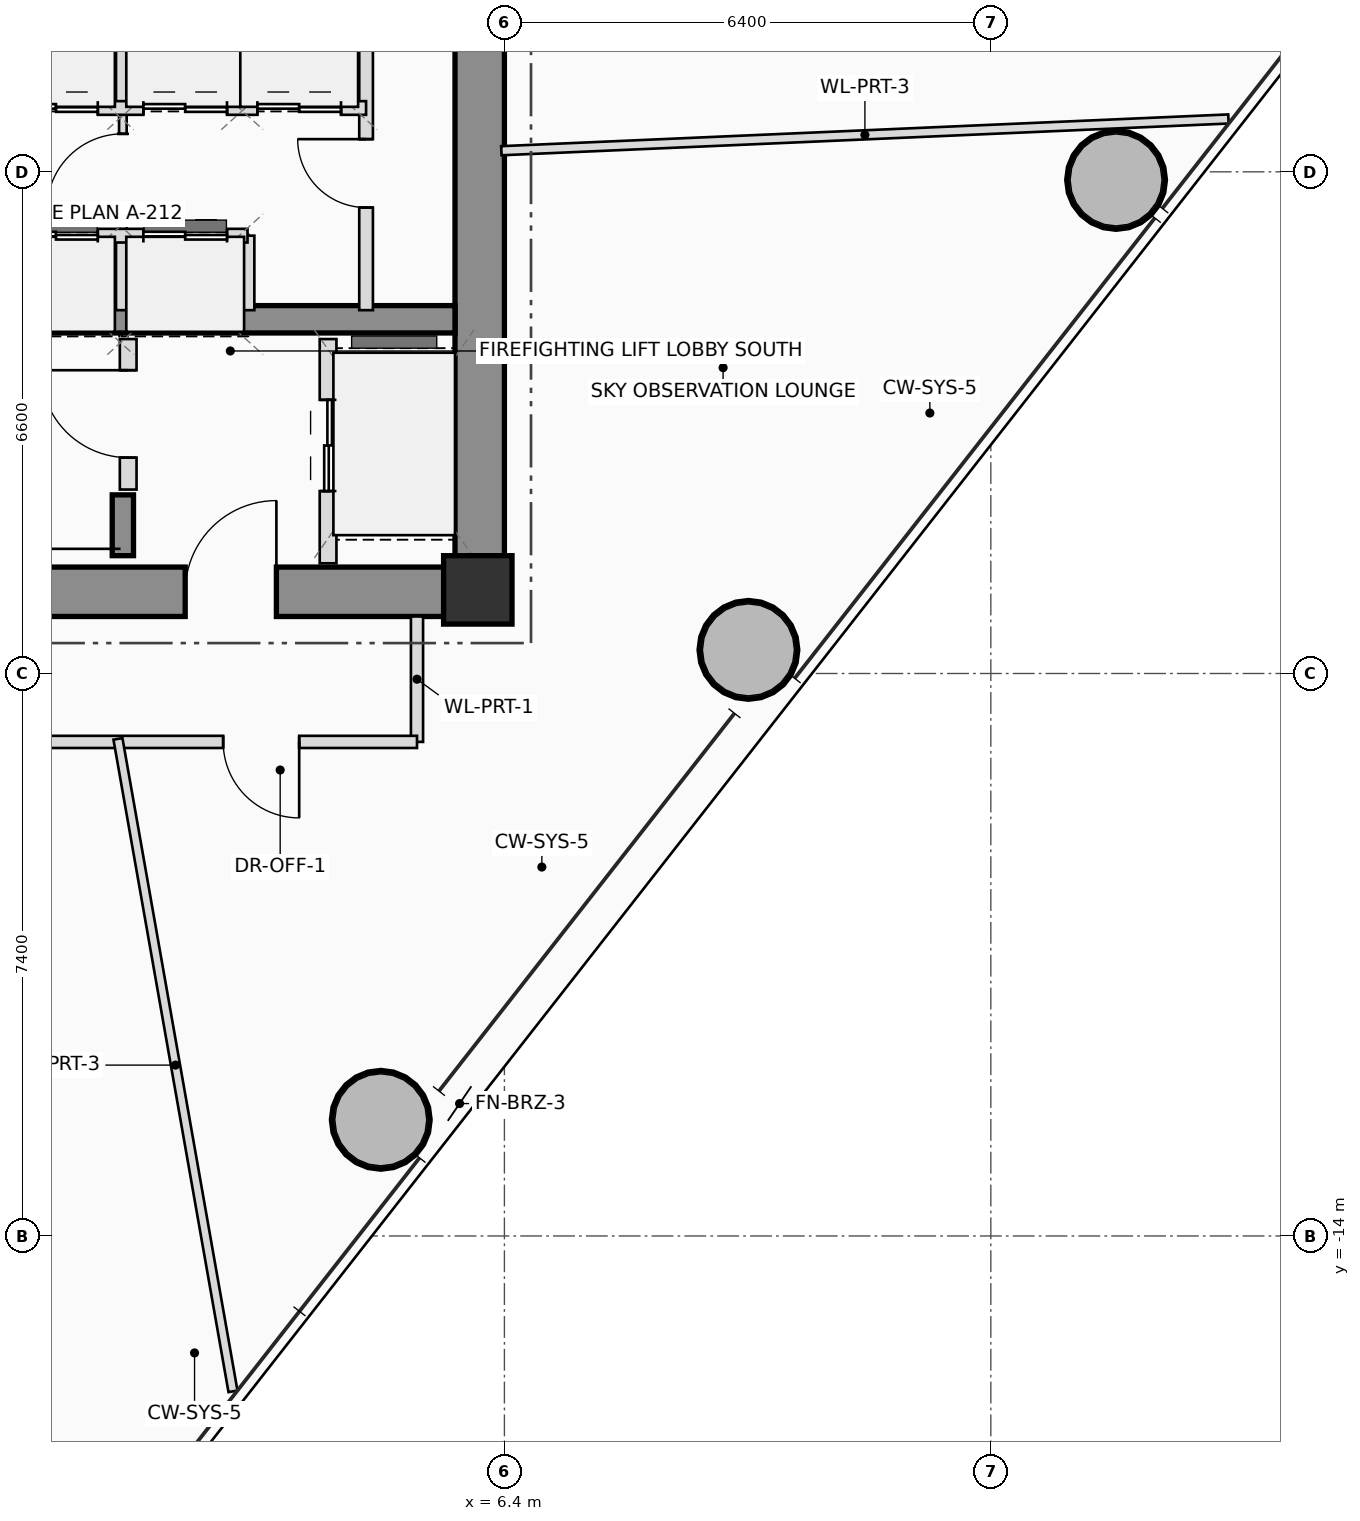
"""IFC4 building model, lengths in metres.
Left out: names, types, materials, properties, quantities, classifications, styles, units other than length and angle.
Written with IfcOpenShell. Run it as: python <this file> out.ifc"""

import sys

from ifc_helpers import new_model, si_unit, direction, frame, frame_2d, origin, origin_2d, place, context, subcontext, project, spatial, rectangle, hollow_circle, extrude, source, transform, mapped, element, fill, save


model = new_model("IFC4")
c1 = context("Model", 3, precision=1e-05, world=origin(), true_north=direction((0.0, 1.0)))
c2 = subcontext(c1, "Body", "Model", "MODEL_VIEW")
j1 = project(units=[si_unit("LENGTHUNIT", "METRE"), si_unit("PLANEANGLEUNIT", "RADIAN")], contexts=[c1])
p1 = place(None, origin())
s1 = spatial("IfcSite", under=j1, at=p1, CompositionType="ELEMENT")
p2 = place(p1, origin())
s2 = spatial("IfcBuilding", under=s1, at=p2, CompositionType="ELEMENT")
p3 = place(p2, frame((0.0, 0.0, 125.0)))
s3 = spatial("IfcBuildingStorey", under=s2, at=p3, CompositionType="ELEMENT", Elevation=125.0)
m1 = source(origin(), c2, "Body", "SweptSolid", [
    extrude(rectangle(XDim=0.9, YDim=0.9, at=origin_2d()), origin(), (0.0, 0.0, 1.0), 4.5),
])
p4 = place(p3, frame((6.05, -5.5, 0.0), z_axis=(0.0, 0.0, 1.0), x_axis=(1.0, 0.0, 0.0)))
e1 = element("IfcColumn", 1, at=p4, inside=s3, PredefinedType="COLUMN", context=c2, shape_type="MappedRepresentation", body=[
    mapped(m1, transform((0.0, 0.0, 0.0), scale=1.0)),
])
p5 = place(p3, frame((-6.4, -5.525, 0.0), z_axis=(0.0, 0.0, 1.0), x_axis=(1.0, 0.0, 0.0)))
e2 = element("IfcWall", 2, at=p5, inside=s3, PredefinedType="SHEAR", context=c2, shape_type="SweptSolid", body=[
    extrude(rectangle(XDim=12.8, YDim=0.65, at=frame_2d((6.4, 0.0))), origin(), (0.0, 0.0, 1.0), 4.5),
])
p6 = place(p5, frame((8.6, 0.0, 0.0)))
e3 = element("IfcOpeningElement", 3, at=p6, cuts=e2, PredefinedType="OPENING", context=c2, shape_type="SweptSolid", body=[
    extrude(rectangle(XDim=1.2, YDim=2.2, at=frame_2d((0.6, 1.1))), frame((0.0, 0.335, 0.0), z_axis=(0.0, -1.0, 0.0), x_axis=(1.0, 0.0, 0.0)), (0.0, 0.0, 1.0), 0.67),
])
p7 = place(p3, frame((6.075, -5.2, 0.0), z_axis=(0.0, 0.0, 1.0), x_axis=(0.0, 1.0, 0.0)))
e4 = element("IfcWall", 4, at=p7, inside=s3, PredefinedType="SHEAR", context=c2, shape_type="SweptSolid", body=[
    extrude(rectangle(XDim=10.4, YDim=0.65, at=frame_2d((5.2, 0.0))), origin(), (0.0, 0.0, 1.0), 4.5),
])
p8 = place(p3, frame((-5.75, -1.94, 0.0), z_axis=(0.0, 0.0, 1.0), x_axis=(1.0, 0.0, 0.0)))
e5 = element("IfcWall", 5, at=p8, inside=s3, PredefinedType="SHEAR", context=c2, shape_type="SweptSolid", body=[
    extrude(rectangle(XDim=11.5, YDim=0.36, at=frame_2d((5.75, 0.0))), origin(), (0.0, 0.0, 1.0), 4.5),
])
p9 = place(p3, frame((1.38, -5.05, 0.0), z_axis=(0.0, 0.0, 1.0), x_axis=(0.0, 1.0, 0.0)))
e6 = element("IfcWall", 6, at=p9, inside=s3, PredefinedType="SHEAR", context=c2, shape_type="SweptSolid", body=[
    extrude(rectangle(XDim=0.8, YDim=0.28, at=frame_2d((0.4, 0.0))), origin(), (0.0, 0.0, 1.0), 4.5),
])
m2 = source(origin(), c2, "Body", "SweptSolid", [
    extrude(hollow_circle(Radius=0.65, WallThickness=0.045, at=origin_2d()), origin(), (0.0, 0.0, 1.0), 4.5),
])
for number, where, z_axis, x_axis in (
    (7, (4.773, -12.472, 0.0), (0.0, 0.0, 1.0), (1.0, 0.0, 0.0)),
    (8, (9.611, -6.289, 0.0), (0.0, 0.0, 1.0), (1.0, 0.0, 0.0)),
    (9, (14.448, -0.107, 0.0), (0.0, 0.0, 1.0), (1.0, 0.0, 0.0)),
):
    element("IfcColumn", number, at=place(p3, frame(where, z_axis=z_axis, x_axis=x_axis)), inside=s3, PredefinedType="COLUMN", context=c2, shape_type="MappedRepresentation", body=[
        mapped(m2, transform((0.0, 0.0, 0.0), scale=1.0)),
    ])
p10 = place(p3, frame((1.45, -4.18, 0.0), z_axis=(0.0, 0.0, 1.0), x_axis=(0.0, 1.0, 0.0)))
e10 = element("IfcWall", 10, at=p10, inside=s3, PredefinedType="PLUMBINGWALL", context=c2, shape_type="SweptSolid", body=[
    extrude(rectangle(XDim=1.98, YDim=0.22, at=frame_2d((0.99, 0.0))), origin(), (0.0, 0.0, 1.0), 4.3),
])
p11 = place(p10, frame((0.42, 0.0, 0.0)))
e11 = element("IfcOpeningElement", 11, at=p11, cuts=e10, PredefinedType="OPENING", context=c2, shape_type="SweptSolid", body=[
    extrude(rectangle(XDim=1.15, YDim=2.15, at=frame_2d((0.575, 1.075))), frame((0.0, 0.12, 0.0), z_axis=(0.0, -1.0, 0.0), x_axis=(1.0, 0.0, 0.0)), (0.0, 0.0, 1.0), 0.24),
])
p12 = place(p3, frame((4.08, -5.15, 0.0), z_axis=(0.0, 0.0, 1.0), x_axis=(0.0, 1.0, 0.0)))
e12 = element("IfcWall", 12, at=p12, inside=s3, PredefinedType="PLUMBINGWALL", context=c2, shape_type="SweptSolid", body=[
    extrude(rectangle(XDim=2.95, YDim=0.22, at=frame_2d((1.475, 0.0))), origin(), (0.0, 0.0, 1.0), 4.3),
])
p13 = place(p12, frame((0.95, 0.0, 0.0)))
e13 = element("IfcOpeningElement", 13, at=p13, cuts=e12, PredefinedType="OPENING", context=c2, shape_type="SweptSolid", body=[
    extrude(rectangle(XDim=1.2, YDim=2.25, at=frame_2d((0.6, 1.125))), frame((0.0, 0.12, 0.0), z_axis=(0.0, -1.0, 0.0), x_axis=(1.0, 0.0, 0.0)), (0.0, 0.0, 1.0), 0.24),
])
p14 = place(p3, frame((1.38, -0.84, 0.0), z_axis=(0.0, 0.0, 1.0), x_axis=(0.0, 1.0, 0.0)))
e14 = element("IfcWall", 14, at=p14, inside=s3, PredefinedType="PARTITIONING", context=c2, shape_type="SweptSolid", body=[
    extrude(rectangle(XDim=1.68, YDim=0.1, at=frame_2d((0.84, 0.0))), origin(), (0.0, 0.0, 1.0), 4.3),
])
p15 = place(p14, frame((0.34, 0.0, 0.0)))
e15 = element("IfcOpeningElement", 15, at=p15, cuts=e14, PredefinedType="OPENING", context=c2, shape_type="SweptSolid", body=[
    extrude(rectangle(XDim=1.0, YDim=2.25, at=frame_2d((0.5, 1.125))), frame((0.0, 0.06, 0.0), z_axis=(0.0, -1.0, 0.0), x_axis=(1.0, 0.0, 0.0)), (0.0, 0.0, 1.0), 0.12),
])
for number, where, z_axis, x_axis in (
    (16, (1.38, 0.84, 0.0), (0.0, 0.0, 1.0), (0.0, 1.0, 0.0)),
    (17, (1.38, -1.82, 0.0), (0.0, 0.0, 1.0), (0.0, 1.0, 0.0)),
    (18, (3.02, 0.84, 0.0), (0.0, 0.0, 1.0), (0.0, 1.0, 0.0)),
    (19, (4.38, 0.84, 0.0), (0.0, 0.0, 1.0), (0.0, 1.0, 0.0)),
    (20, (3.02, -1.82, 0.0), (0.0, 0.0, 1.0), (0.0, 1.0, 0.0)),
):
    element("IfcWall", number, at=place(p3, frame(where, z_axis=z_axis, x_axis=x_axis)), inside=s3, PredefinedType="PLUMBINGWALL", context=c2, shape_type="SweptSolid", body=[
        extrude(rectangle(XDim=0.98, YDim=0.18, at=frame_2d((0.49, 0.0))), origin(), (0.0, 0.0, 1.0), 4.3),
    ])
p16 = place(p3, frame((4.58, -1.82, 0.0), z_axis=(0.0, 0.0, 1.0), x_axis=(0.0, 1.0, 0.0)))
e21 = element("IfcWall", 21, at=p16, inside=s3, PredefinedType="PLUMBINGWALL", context=c2, shape_type="SweptSolid", body=[
    extrude(rectangle(XDim=3.64, YDim=0.18, at=frame_2d((1.82, 0.0))), origin(), (0.0, 0.0, 1.0), 4.3),
])
p17 = place(p16, frame((1.35, 0.0, 0.0)))
e22 = element("IfcOpeningElement", 22, at=p17, cuts=e21, PredefinedType="OPENING", context=c2, shape_type="SweptSolid", body=[
    extrude(rectangle(XDim=0.9, YDim=2.05, at=frame_2d((0.45, 1.025))), frame((0.0, 0.1, 0.0), z_axis=(0.0, -1.0, 0.0), x_axis=(1.0, 0.0, 0.0)), (0.0, 0.0, 1.0), 0.2),
])
p18 = place(p3, frame((-5.68, 0.84, 0.0), z_axis=(0.0, 0.0, 1.0), x_axis=(1.0, 0.0, 0.0)))
e23 = element("IfcWall", 23, at=p18, inside=s3, PredefinedType="PLUMBINGWALL", context=c2, shape_type="SweptSolid", body=[
    extrude(rectangle(XDim=10.26, YDim=0.18, at=frame_2d((5.13, 0.0))), origin(), (0.0, 0.0, 1.0), 4.3),
])
p19 = place(p18, frame((1.08, 0.0, 0.0)))
e24 = element("IfcOpeningElement", 24, at=p19, cuts=e23, PredefinedType="OPENING", context=c2, shape_type="SweptSolid", body=[
    extrude(rectangle(XDim=0.9, YDim=2.05, at=frame_2d((0.45, 1.025))), frame((0.0, 0.1, 0.0), z_axis=(0.0, -1.0, 0.0), x_axis=(1.0, 0.0, 0.0)), (0.0, 0.0, 1.0), 0.2),
])
p20 = place(p18, frame((3.93, 0.0, 0.0)))
e25 = element("IfcOpeningElement", 25, at=p20, cuts=e23, PredefinedType="OPENING", context=c2, shape_type="SweptSolid", body=[
    extrude(rectangle(XDim=1.1, YDim=2.2, at=frame_2d((0.55, 1.1))), frame((0.0, 0.1, 0.0), z_axis=(0.0, -1.0, 0.0), x_axis=(1.0, 0.0, 0.0)), (0.0, 0.0, 1.0), 0.2),
])
p21 = place(p18, frame((5.63, 0.0, 0.0)))
e26 = element("IfcOpeningElement", 26, at=p21, cuts=e23, PredefinedType="OPENING", context=c2, shape_type="SweptSolid", body=[
    extrude(rectangle(XDim=1.1, YDim=2.2, at=frame_2d((0.55, 1.1))), frame((0.0, 0.1, 0.0), z_axis=(0.0, -1.0, 0.0), x_axis=(1.0, 0.0, 0.0)), (0.0, 0.0, 1.0), 0.2),
])
p22 = place(p18, frame((7.33, 0.0, 0.0)))
e27 = element("IfcOpeningElement", 27, at=p22, cuts=e23, PredefinedType="OPENING", context=c2, shape_type="SweptSolid", body=[
    extrude(rectangle(XDim=1.1, YDim=2.2, at=frame_2d((0.55, 1.1))), frame((0.0, 0.1, 0.0), z_axis=(0.0, -1.0, 0.0), x_axis=(1.0, 0.0, 0.0)), (0.0, 0.0, 1.0), 0.2),
])
p23 = place(p18, frame((8.83, 0.0, 0.0)))
e28 = element("IfcOpeningElement", 28, at=p23, cuts=e23, PredefinedType="OPENING", context=c2, shape_type="SweptSolid", body=[
    extrude(rectangle(XDim=1.1, YDim=2.2, at=frame_2d((0.55, 1.1))), frame((0.0, 0.1, 0.0), z_axis=(0.0, -1.0, 0.0), x_axis=(1.0, 0.0, 0.0)), (0.0, 0.0, 1.0), 0.2),
])
p24 = place(p3, frame((-5.68, -0.84, 0.0), z_axis=(0.0, 0.0, 1.0), x_axis=(1.0, 0.0, 0.0)))
e29 = element("IfcWall", 29, at=p24, inside=s3, PredefinedType="PLUMBINGWALL", context=c2, shape_type="SweptSolid", body=[
    extrude(rectangle(XDim=8.7, YDim=0.18, at=frame_2d((4.35, 0.0))), origin(), (0.0, 0.0, 1.0), 4.3),
])
p25 = place(p24, frame((1.68, 0.0, 0.0)))
e30 = element("IfcOpeningElement", 30, at=p25, cuts=e29, PredefinedType="OPENING", context=c2, shape_type="SweptSolid", body=[
    extrude(rectangle(XDim=0.9, YDim=2.05, at=frame_2d((0.45, 1.025))), frame((0.0, 0.1, 0.0), z_axis=(0.0, -1.0, 0.0), x_axis=(1.0, 0.0, 0.0)), (0.0, 0.0, 1.0), 0.2),
])
p26 = place(p24, frame((3.93, 0.0, 0.0)))
e31 = element("IfcOpeningElement", 31, at=p26, cuts=e29, PredefinedType="OPENING", context=c2, shape_type="SweptSolid", body=[
    extrude(rectangle(XDim=1.1, YDim=2.2, at=frame_2d((0.55, 1.1))), frame((0.0, 0.1, 0.0), z_axis=(0.0, -1.0, 0.0), x_axis=(1.0, 0.0, 0.0)), (0.0, 0.0, 1.0), 0.2),
])
p27 = place(p24, frame((5.63, 0.0, 0.0)))
e32 = element("IfcOpeningElement", 32, at=p27, cuts=e29, PredefinedType="OPENING", context=c2, shape_type="SweptSolid", body=[
    extrude(rectangle(XDim=1.1, YDim=2.2, at=frame_2d((0.55, 1.1))), frame((0.0, 0.1, 0.0), z_axis=(0.0, -1.0, 0.0), x_axis=(1.0, 0.0, 0.0)), (0.0, 0.0, 1.0), 0.2),
])
p28 = place(p24, frame((7.33, 0.0, 0.0)))
e33 = element("IfcOpeningElement", 33, at=p28, cuts=e29, PredefinedType="OPENING", context=c2, shape_type="SweptSolid", body=[
    extrude(rectangle(XDim=1.1, YDim=2.2, at=frame_2d((0.55, 1.1))), frame((0.0, 0.1, 0.0), z_axis=(0.0, -1.0, 0.0), x_axis=(1.0, 0.0, 0.0)), (0.0, 0.0, 1.0), 0.2),
])
p29 = place(p3, frame((5.25, -5.85, 0.0), z_axis=(0.0, 0.0, 1.0), x_axis=(0.0, -1.0, 0.0)))
e34 = element("IfcWall", 34, at=p29, inside=s3, PredefinedType="PARTITIONING", context=c2, shape_type="SweptSolid", body=[
    extrude(rectangle(XDim=1.65, YDim=0.16, at=frame_2d((0.825, 0.0))), origin(), (0.0, 0.0, 1.0), 4.3),
])
p30 = place(p3, frame((5.25, -7.5, 0.0), z_axis=(0.0, 0.0, 1.0), x_axis=(-1.0, 0.0, 0.0)))
e35 = element("IfcWall", 35, at=p30, inside=s3, PredefinedType="PARTITIONING", context=c2, shape_type="SweptSolid", body=[
    extrude(rectangle(XDim=11.61, YDim=0.16, at=frame_2d((5.805, 0.0))), origin(), (0.0, 0.0, 1.0), 3.655),
])
p31 = place(p30, frame((1.55, 0.0, 0.0)))
e36 = element("IfcOpeningElement", 36, at=p31, cuts=e35, PredefinedType="OPENING", context=c2, shape_type="SweptSolid", body=[
    extrude(rectangle(XDim=1.0, YDim=2.25, at=frame_2d((0.5, 1.125))), frame((0.0, 0.09, 0.0), z_axis=(0.0, -1.0, 0.0), x_axis=(1.0, 0.0, 0.0)), (0.0, 0.0, 1.0), 0.18),
])
p32 = place(p3, frame((6.36, 0.278, 0.0), z_axis=(0.0, 0.0, 1.0), x_axis=(0.999047913846, 0.043626435113, 0.0)))
e37 = element("IfcWall", 37, at=p32, inside=s3, PredefinedType="PARTITIONING", context=c2, shape_type="SweptSolid", body=[
    extrude(rectangle(XDim=9.575, YDim=0.12, at=frame_2d((4.788, 0.0))), origin(), (0.0, 0.0, 1.0), 3.655),
])
p33 = place(p3, frame((1.315, -7.46, 0.0), z_axis=(0.0, 0.0, 1.0), x_axis=(0.173652714894, -0.984806952966, 0.0)))
e38 = element("IfcWall", 38, at=p33, inside=s3, PredefinedType="PARTITIONING", context=c2, shape_type="SweptSolid", body=[
    extrude(rectangle(XDim=8.717, YDim=0.12, at=frame_2d((4.358, 0.0))), origin(), (0.0, 0.0, 1.0), 3.815),
])
p34 = place(p6, origin())
e39 = element("IfcDoor", 39, at=p34, inside=s3, OperationType="SINGLE_SWING_RIGHT", PredefinedType="DOOR", context=c2, shape_type="SweptSolid", body=[
    extrude(rectangle(XDim=1.2, YDim=2.2, at=frame_2d((0.6, 1.1))), frame((0.0, 0.025, 0.0), z_axis=(0.0, -1.0, 0.0), x_axis=(1.0, 0.0, 0.0)), (0.0, 0.0, 1.0), 0.05),
])
fill(e3, e39)
p35 = place(p11, origin())
e40 = element("IfcDoor", 40, at=p35, inside=s3, OperationType="SINGLE_SWING_RIGHT", PredefinedType="DOOR", context=c2, shape_type="SweptSolid", body=[
    extrude(rectangle(XDim=1.15, YDim=2.15, at=frame_2d((0.575, 1.075))), frame((0.0, 0.025, 0.0), z_axis=(0.0, -1.0, 0.0), x_axis=(1.0, 0.0, 0.0)), (0.0, 0.0, 1.0), 0.05),
])
fill(e11, e40)
p36 = place(p13, origin())
e41 = element("IfcDoor", 41, at=p36, inside=s3, OperationType="DOUBLE_DOOR_SLIDING", PredefinedType="DOOR", context=c2, shape_type="SweptSolid", body=[
    extrude(rectangle(XDim=1.2, YDim=2.25, at=frame_2d((0.6, 1.125))), frame((0.0, 0.025, 0.0), z_axis=(0.0, -1.0, 0.0), x_axis=(1.0, 0.0, 0.0)), (0.0, 0.0, 1.0), 0.05),
])
fill(e13, e41)
p37 = place(p15, origin())
e42 = element("IfcDoor", 42, at=p37, inside=s3, OperationType="SINGLE_SWING_LEFT", PredefinedType="DOOR", context=c2, shape_type="SweptSolid", body=[
    extrude(rectangle(XDim=1.0, YDim=2.25, at=frame_2d((0.5, 1.125))), frame((0.0, 0.025, 0.0), z_axis=(0.0, -1.0, 0.0), x_axis=(1.0, 0.0, 0.0)), (0.0, 0.0, 1.0), 0.05),
])
fill(e15, e42)
p38 = place(p17, origin())
e43 = element("IfcDoor", 43, at=p38, inside=s3, OperationType="SINGLE_SWING_RIGHT", PredefinedType="DOOR", context=c2, shape_type="SweptSolid", body=[
    extrude(rectangle(XDim=0.9, YDim=2.05, at=frame_2d((0.45, 1.025))), frame((0.0, 0.025, 0.0), z_axis=(0.0, -1.0, 0.0), x_axis=(1.0, 0.0, 0.0)), (0.0, 0.0, 1.0), 0.05),
])
fill(e22, e43)
p39 = place(p21, origin())
e44 = element("IfcDoor", 44, at=p39, inside=s3, OperationType="DOUBLE_DOOR_SLIDING", PredefinedType="DOOR", context=c2, shape_type="SweptSolid", body=[
    extrude(rectangle(XDim=1.1, YDim=2.2, at=frame_2d((0.55, 1.1))), frame((0.0, 0.025, 0.0), z_axis=(0.0, -1.0, 0.0), x_axis=(1.0, 0.0, 0.0)), (0.0, 0.0, 1.0), 0.05),
])
fill(e26, e44)
p40 = place(p22, origin())
e45 = element("IfcDoor", 45, at=p40, inside=s3, OperationType="DOUBLE_DOOR_SLIDING", PredefinedType="DOOR", context=c2, shape_type="SweptSolid", body=[
    extrude(rectangle(XDim=1.1, YDim=2.2, at=frame_2d((0.55, 1.1))), frame((0.0, 0.025, 0.0), z_axis=(0.0, -1.0, 0.0), x_axis=(1.0, 0.0, 0.0)), (0.0, 0.0, 1.0), 0.05),
])
fill(e27, e45)
p41 = place(p23, origin())
e46 = element("IfcDoor", 46, at=p41, inside=s3, OperationType="DOUBLE_DOOR_SLIDING", PredefinedType="DOOR", context=c2, shape_type="SweptSolid", body=[
    extrude(rectangle(XDim=1.1, YDim=2.2, at=frame_2d((0.55, 1.1))), frame((0.0, 0.025, 0.0), z_axis=(0.0, -1.0, 0.0), x_axis=(1.0, 0.0, 0.0)), (0.0, 0.0, 1.0), 0.05),
])
fill(e28, e46)
p42 = place(p27, origin())
e47 = element("IfcDoor", 47, at=p42, inside=s3, OperationType="DOUBLE_DOOR_SLIDING", PredefinedType="DOOR", context=c2, shape_type="SweptSolid", body=[
    extrude(rectangle(XDim=1.1, YDim=2.2, at=frame_2d((0.55, 1.1))), frame((0.0, 0.025, 0.0), z_axis=(0.0, -1.0, 0.0), x_axis=(1.0, 0.0, 0.0)), (0.0, 0.0, 1.0), 0.05),
])
fill(e32, e47)
p43 = place(p28, origin())
e48 = element("IfcDoor", 48, at=p43, inside=s3, OperationType="DOUBLE_DOOR_SLIDING", PredefinedType="DOOR", context=c2, shape_type="SweptSolid", body=[
    extrude(rectangle(XDim=1.1, YDim=2.2, at=frame_2d((0.55, 1.1))), frame((0.0, 0.025, 0.0), z_axis=(0.0, -1.0, 0.0), x_axis=(1.0, 0.0, 0.0)), (0.0, 0.0, 1.0), 0.05),
])
fill(e33, e48)
p44 = place(p31, origin())
e49 = element("IfcDoor", 49, at=p44, inside=s3, OperationType="SINGLE_SWING_LEFT", PredefinedType="DOOR", context=c2, shape_type="SweptSolid", body=[
    extrude(rectangle(XDim=1.0, YDim=2.25, at=frame_2d((0.5, 1.125))), frame((0.0, 0.025, 0.0), z_axis=(0.0, -1.0, 0.0), x_axis=(1.0, 0.0, 0.0)), (0.0, 0.0, 1.0), 0.05),
])
fill(e36, e49)
save(model, sys.argv[1])
